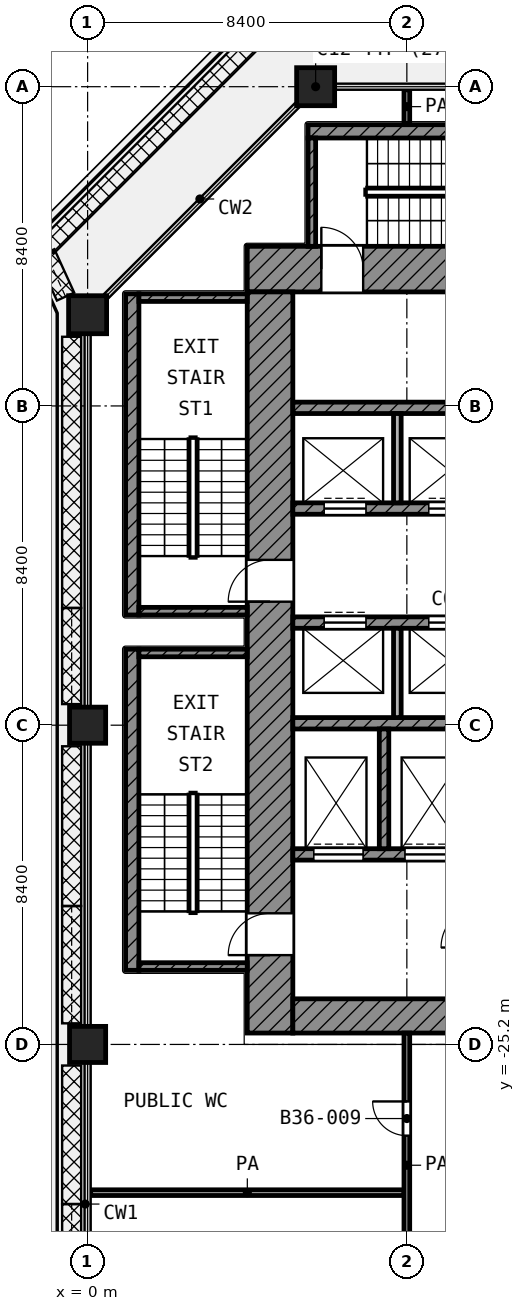
"""IFC4 building model, lengths in metres.
Left out: names, types, materials, properties, quantities, classifications, styles, units other than length and angle.
Written with IfcOpenShell. Run it as: python <this file> out.ifc"""

import sys

from ifc_helpers import new_model, si_unit, direction, frame, frame_2d, origin, origin_2d, place, context, subcontext, project, spatial, rectangle, extrude, element, fill, save


model = new_model("IFC4")
c1 = context("Model", 3, precision=1e-05, world=origin(), true_north=direction((0.0, 1.0)))
c2 = subcontext(c1, "Body", "Model", "MODEL_VIEW")
j1 = project(units=[si_unit("LENGTHUNIT", "METRE"), si_unit("PLANEANGLEUNIT", "RADIAN")], contexts=[c1])
p1 = place(None, origin())
s1 = spatial("IfcSite", under=j1, at=p1, CompositionType="ELEMENT")
p2 = place(p1, origin())
s2 = spatial("IfcBuilding", under=s1, at=p2, CompositionType="ELEMENT")
p3 = place(p2, frame((0.0, 0.0, 158.4)))
s3 = spatial("IfcBuildingStorey", under=s2, at=p3, CompositionType="ELEMENT", Elevation=158.4)
for number, where, z_axis, x_axis in (
    (1, (6.0, 0.0, 0.0), (0.0, 0.0, 1.0), (1.0, 0.0, 0.0)),
    (2, (0.0, -6.0, 0.0), (0.0, 0.0, 1.0), (1.0, 0.0, 0.0)),
):
    element("IfcColumn", number, at=place(p3, frame(where, z_axis=z_axis, x_axis=x_axis)), inside=s3, PredefinedType="COLUMN", context=c2, shape_type="SweptSolid", body=[
        extrude(rectangle(XDim=1.0, YDim=1.0, at=origin_2d()), origin(), (0.0, 0.0, 1.0), 4.2),
    ])
for number, where, z_axis, x_axis in (
    (3, (0.0, -16.8, 0.0), (0.0, 0.0, 1.0), (1.0, 0.0, 0.0)),
    (4, (0.0, -25.2, 0.0), (0.0, 0.0, 1.0), (1.0, 0.0, 0.0)),
):
    element("IfcColumn", number, at=place(p3, frame(where, z_axis=z_axis, x_axis=x_axis)), inside=s3, PredefinedType="COLUMN", context=c2, shape_type="SweptSolid", body=[
        extrude(rectangle(XDim=0.95, YDim=0.95, at=origin_2d()), origin(), (0.0, 0.0, 1.0), 4.2),
    ])
p4 = place(p3, frame((4.2, -4.8, 0.0), z_axis=(0.0, 0.0, 1.0), x_axis=(1.0, 0.0, 0.0)))
e5 = element("IfcWall", 5, at=p4, inside=s3, PredefinedType="SHEAR", context=c2, shape_type="SweptSolid", body=[
    extrude(rectangle(XDim=20.7, YDim=1.2, at=frame_2d((10.35, 0.0))), origin(), (0.0, 0.0, 1.0), 3.6),
])
p5 = place(p4, frame((1.95, 0.0, 0.0)))
e6 = element("IfcOpeningElement", 6, at=p5, cuts=e5, PredefinedType="OPENING", context=c2, shape_type="SweptSolid", body=[
    extrude(rectangle(XDim=1.1, YDim=2.1, at=frame_2d((0.55, 1.05))), frame((0.0, 0.61, 0.0), z_axis=(0.0, -1.0, 0.0), x_axis=(1.0, 0.0, 0.0)), (0.0, 0.0, 1.0), 1.22),
])
p6 = place(p4, frame((17.95, 0.0, 0.0)))
e7 = element("IfcOpeningElement", 7, at=p6, cuts=e5, PredefinedType="OPENING", context=c2, shape_type="SweptSolid", body=[
    extrude(rectangle(XDim=1.1, YDim=2.1, at=frame_2d((0.55, 1.05))), frame((0.0, 0.61, 0.0), z_axis=(0.0, -1.0, 0.0), x_axis=(1.0, 0.0, 0.0)), (0.0, 0.0, 1.0), 1.22),
])
p7 = place(p3, frame((4.8, -24.9, 0.0), z_axis=(0.0, 0.0, 1.0), x_axis=(0.0, 1.0, 0.0)))
e8 = element("IfcWall", 8, at=p7, inside=s3, PredefinedType="SHEAR", context=c2, shape_type="SweptSolid", body=[
    extrude(rectangle(XDim=19.5, YDim=1.2, at=frame_2d((9.75, 0.0))), origin(), (0.0, 0.0, 1.0), 3.6),
])
p8 = place(p7, frame((11.35, 0.0, 0.0)))
e9 = element("IfcOpeningElement", 9, at=p8, cuts=e8, PredefinedType="OPENING", context=c2, shape_type="SweptSolid", body=[
    extrude(rectangle(XDim=1.1, YDim=2.1, at=frame_2d((0.55, 1.05))), frame((0.0, 0.61, 0.0), z_axis=(0.0, -1.0, 0.0), x_axis=(1.0, 0.0, 0.0)), (0.0, 0.0, 1.0), 1.22),
])
p9 = place(p7, frame((2.05, 0.0, 0.0)))
e10 = element("IfcOpeningElement", 10, at=p9, cuts=e8, PredefinedType="OPENING", context=c2, shape_type="SweptSolid", body=[
    extrude(rectangle(XDim=1.1, YDim=2.1, at=frame_2d((0.55, 1.05))), frame((0.0, 0.61, 0.0), z_axis=(0.0, -1.0, 0.0), x_axis=(1.0, 0.0, 0.0)), (0.0, 0.0, 1.0), 1.22),
])
p10 = place(p3, frame((5.4, -24.45, 0.0), z_axis=(0.0, 0.0, 1.0), x_axis=(1.0, 0.0, 0.0)))
e11 = element("IfcWall", 11, at=p10, inside=s3, PredefinedType="SHEAR", context=c2, shape_type="SweptSolid", body=[
    extrude(rectangle(XDim=18.6, YDim=0.9, at=frame_2d((9.3, 0.0))), origin(), (0.0, 0.0, 1.0), 3.6),
])
p11 = place(p10, frame((6.3, 0.0, 0.0)))
e12 = element("IfcOpeningElement", 12, at=p11, cuts=e11, PredefinedType="OPENING", context=c2, shape_type="SweptSolid", body=[
    extrude(rectangle(XDim=1.8, YDim=2.1, at=frame_2d((0.9, 1.05))), frame((0.0, 0.46, 0.0), z_axis=(0.0, -1.0, 0.0), x_axis=(1.0, 0.0, 0.0)), (0.0, 0.0, 1.0), 0.92),
])
p12 = place(p3, frame((5.4, -8.45, 0.0), z_axis=(0.0, 0.0, 1.0), x_axis=(1.0, 0.0, 0.0)))
e13 = element("IfcWall", 13, at=p12, inside=s3, PredefinedType="SHEAR", context=c2, shape_type="SweptSolid", body=[
    extrude(rectangle(XDim=16.65, YDim=0.3, at=frame_2d((8.325, 0.0))), origin(), (0.0, 0.0, 1.0), 3.6),
])
p13 = place(p3, frame((5.4, -11.1, 0.0), z_axis=(0.0, 0.0, 1.0), x_axis=(1.0, 0.0, 0.0)))
e14 = element("IfcWall", 14, at=p13, inside=s3, PredefinedType="SHEAR", context=c2, shape_type="SweptSolid", body=[
    extrude(rectangle(XDim=16.65, YDim=0.3, at=frame_2d((8.325, 0.0))), origin(), (0.0, 0.0, 1.0), 3.6),
])
p14 = place(p13, frame((0.825, 0.0, 0.0)))
e15 = element("IfcOpeningElement", 15, at=p14, cuts=e14, PredefinedType="OPENING", context=c2, shape_type="SweptSolid", body=[
    extrude(rectangle(XDim=1.1, YDim=2.1, at=frame_2d((0.55, 1.05))), frame((0.0, 0.16, 0.0), z_axis=(0.0, -1.0, 0.0), x_axis=(1.0, 0.0, 0.0)), (0.0, 0.0, 1.0), 0.32),
])
p15 = place(p13, frame((3.575, 0.0, 0.0)))
e16 = element("IfcOpeningElement", 16, at=p15, cuts=e14, PredefinedType="OPENING", context=c2, shape_type="SweptSolid", body=[
    extrude(rectangle(XDim=1.1, YDim=2.1, at=frame_2d((0.55, 1.05))), frame((0.0, 0.16, 0.0), z_axis=(0.0, -1.0, 0.0), x_axis=(1.0, 0.0, 0.0)), (0.0, 0.0, 1.0), 0.32),
])
p16 = place(p13, frame((6.325, 0.0, 0.0)))
e17 = element("IfcOpeningElement", 17, at=p16, cuts=e14, PredefinedType="OPENING", context=c2, shape_type="SweptSolid", body=[
    extrude(rectangle(XDim=1.1, YDim=2.1, at=frame_2d((0.55, 1.05))), frame((0.0, 0.16, 0.0), z_axis=(0.0, -1.0, 0.0), x_axis=(1.0, 0.0, 0.0)), (0.0, 0.0, 1.0), 0.32),
])
p17 = place(p13, frame((9.075, 0.0, 0.0)))
e18 = element("IfcOpeningElement", 18, at=p17, cuts=e14, PredefinedType="OPENING", context=c2, shape_type="SweptSolid", body=[
    extrude(rectangle(XDim=1.1, YDim=2.1, at=frame_2d((0.55, 1.05))), frame((0.0, 0.16, 0.0), z_axis=(0.0, -1.0, 0.0), x_axis=(1.0, 0.0, 0.0)), (0.0, 0.0, 1.0), 0.32),
])
p18 = place(p13, frame((11.825, 0.0, 0.0)))
e19 = element("IfcOpeningElement", 19, at=p18, cuts=e14, PredefinedType="OPENING", context=c2, shape_type="SweptSolid", body=[
    extrude(rectangle(XDim=1.1, YDim=2.1, at=frame_2d((0.55, 1.05))), frame((0.0, 0.16, 0.0), z_axis=(0.0, -1.0, 0.0), x_axis=(1.0, 0.0, 0.0)), (0.0, 0.0, 1.0), 0.32),
])
p19 = place(p13, frame((14.575, 0.0, 0.0)))
e20 = element("IfcOpeningElement", 20, at=p19, cuts=e14, PredefinedType="OPENING", context=c2, shape_type="SweptSolid", body=[
    extrude(rectangle(XDim=1.1, YDim=2.1, at=frame_2d((0.55, 1.05))), frame((0.0, 0.16, 0.0), z_axis=(0.0, -1.0, 0.0), x_axis=(1.0, 0.0, 0.0)), (0.0, 0.0, 1.0), 0.32),
])
p20 = place(p3, frame((5.4, -14.1, 0.0), z_axis=(0.0, 0.0, 1.0), x_axis=(1.0, 0.0, 0.0)))
e21 = element("IfcWall", 21, at=p20, inside=s3, PredefinedType="SHEAR", context=c2, shape_type="SweptSolid", body=[
    extrude(rectangle(XDim=16.65, YDim=0.3, at=frame_2d((8.325, 0.0))), origin(), (0.0, 0.0, 1.0), 3.6),
])
p21 = place(p20, frame((0.825, 0.0, 0.0)))
e22 = element("IfcOpeningElement", 22, at=p21, cuts=e21, PredefinedType="OPENING", context=c2, shape_type="SweptSolid", body=[
    extrude(rectangle(XDim=1.1, YDim=2.1, at=frame_2d((0.55, 1.05))), frame((0.0, 0.16, 0.0), z_axis=(0.0, -1.0, 0.0), x_axis=(1.0, 0.0, 0.0)), (0.0, 0.0, 1.0), 0.32),
])
p22 = place(p20, frame((3.575, 0.0, 0.0)))
e23 = element("IfcOpeningElement", 23, at=p22, cuts=e21, PredefinedType="OPENING", context=c2, shape_type="SweptSolid", body=[
    extrude(rectangle(XDim=1.1, YDim=2.1, at=frame_2d((0.55, 1.05))), frame((0.0, 0.16, 0.0), z_axis=(0.0, -1.0, 0.0), x_axis=(1.0, 0.0, 0.0)), (0.0, 0.0, 1.0), 0.32),
])
p23 = place(p3, frame((5.4, -16.75, 0.0), z_axis=(0.0, 0.0, 1.0), x_axis=(1.0, 0.0, 0.0)))
e24 = element("IfcWall", 24, at=p23, inside=s3, PredefinedType="SHEAR", context=c2, shape_type="SweptSolid", body=[
    extrude(rectangle(XDim=16.65, YDim=0.3, at=frame_2d((8.325, 0.0))), origin(), (0.0, 0.0, 1.0), 3.6),
])
p24 = place(p3, frame((5.4, -20.2, 0.0), z_axis=(0.0, 0.0, 1.0), x_axis=(1.0, 0.0, 0.0)))
e25 = element("IfcWall", 25, at=p24, inside=s3, PredefinedType="SHEAR", context=c2, shape_type="SweptSolid", body=[
    extrude(rectangle(XDim=14.65, YDim=0.3, at=frame_2d((7.325, 0.0))), origin(), (0.0, 0.0, 1.0), 3.6),
])
p25 = place(p24, frame((10.55, 0.0, 0.0)))
e26 = element("IfcOpeningElement", 26, at=p25, cuts=e25, PredefinedType="OPENING", context=c2, shape_type="SweptSolid", body=[
    extrude(rectangle(XDim=1.3, YDim=2.1, at=frame_2d((0.65, 1.05))), frame((0.0, 0.16, 0.0), z_axis=(0.0, -1.0, 0.0), x_axis=(1.0, 0.0, 0.0)), (0.0, 0.0, 1.0), 0.32),
])
p26 = place(p24, frame((12.95, 0.0, 0.0)))
e27 = element("IfcOpeningElement", 27, at=p26, cuts=e25, PredefinedType="OPENING", context=c2, shape_type="SweptSolid", body=[
    extrude(rectangle(XDim=1.3, YDim=2.1, at=frame_2d((0.65, 1.05))), frame((0.0, 0.16, 0.0), z_axis=(0.0, -1.0, 0.0), x_axis=(1.0, 0.0, 0.0)), (0.0, 0.0, 1.0), 0.32),
])
p27 = place(p24, frame((0.55, 0.0, 0.0)))
e28 = element("IfcOpeningElement", 28, at=p27, cuts=e25, PredefinedType="OPENING", context=c2, shape_type="SweptSolid", body=[
    extrude(rectangle(XDim=1.3, YDim=2.1, at=frame_2d((0.65, 1.05))), frame((0.0, 0.16, 0.0), z_axis=(0.0, -1.0, 0.0), x_axis=(1.0, 0.0, 0.0)), (0.0, 0.0, 1.0), 0.32),
])
p28 = place(p24, frame((2.95, 0.0, 0.0)))
e29 = element("IfcOpeningElement", 29, at=p28, cuts=e25, PredefinedType="OPENING", context=c2, shape_type="SweptSolid", body=[
    extrude(rectangle(XDim=1.3, YDim=2.1, at=frame_2d((0.65, 1.05))), frame((0.0, 0.16, 0.0), z_axis=(0.0, -1.0, 0.0), x_axis=(1.0, 0.0, 0.0)), (0.0, 0.0, 1.0), 0.32),
])
p29 = place(p24, frame((6.55, 0.0, 0.0)))
e30 = element("IfcOpeningElement", 30, at=p29, cuts=e25, PredefinedType="OPENING", context=c2, shape_type="SweptSolid", body=[
    extrude(rectangle(XDim=0.9, YDim=2.1, at=frame_2d((0.45, 1.05))), frame((0.0, 0.16, 0.0), z_axis=(0.0, -1.0, 0.0), x_axis=(1.0, 0.0, 0.0)), (0.0, 0.0, 1.0), 0.32),
])
p30 = place(p24, frame((8.95, 0.0, 0.0)))
e31 = element("IfcOpeningElement", 31, at=p30, cuts=e25, PredefinedType="OPENING", context=c2, shape_type="SweptSolid", body=[
    extrude(rectangle(XDim=0.9, YDim=2.1, at=frame_2d((0.45, 1.05))), frame((0.0, 0.16, 0.0), z_axis=(0.0, -1.0, 0.0), x_axis=(1.0, 0.0, 0.0)), (0.0, 0.0, 1.0), 0.32),
])
p31 = place(p3, frame((7.8, -20.05, 0.0), z_axis=(0.0, 0.0, 1.0), x_axis=(0.0, 1.0, 0.0)))
e32 = element("IfcWall", 32, at=p31, inside=s3, PredefinedType="SHEAR", context=c2, shape_type="SweptSolid", body=[
    extrude(rectangle(XDim=3.15, YDim=0.25, at=frame_2d((1.575, 0.0))), origin(), (0.0, 0.0, 1.0), 3.6),
])
p32 = place(p3, frame((8.15, -10.95, 0.0), z_axis=(0.0, 0.0, 1.0), x_axis=(0.0, 1.0, 0.0)))
e33 = element("IfcWall", 33, at=p32, inside=s3, PredefinedType="PARTITIONING", context=c2, shape_type="SweptSolid", body=[
    extrude(rectangle(XDim=2.35, YDim=0.2, at=frame_2d((1.175, 0.0))), origin(), (0.0, 0.0, 1.0), 3.6),
])
p33 = place(p3, frame((8.15, -16.6, 0.0), z_axis=(0.0, 0.0, 1.0), x_axis=(0.0, 1.0, 0.0)))
e34 = element("IfcWall", 34, at=p33, inside=s3, PredefinedType="PARTITIONING", context=c2, shape_type="SweptSolid", body=[
    extrude(rectangle(XDim=2.35, YDim=0.2, at=frame_2d((1.175, 0.0))), origin(), (0.0, 0.0, 1.0), 3.6),
])
p34 = place(p3, frame((1.175, -13.9, 0.0), z_axis=(0.0, 0.0, 1.0), x_axis=(0.0, 1.0, 0.0)))
e35 = element("IfcWall", 35, at=p34, inside=s3, PredefinedType="SHEAR", context=c2, shape_type="SweptSolid", body=[
    extrude(rectangle(XDim=8.45, YDim=0.35, at=frame_2d((4.225, 0.0))), origin(), (0.0, 0.0, 1.0), 3.6),
])
for number, where, z_axis, x_axis in (
    (36, (1.35, -5.55, 0.0), (0.0, 0.0, 1.0), (1.0, 0.0, 0.0)),
    (37, (1.35, -13.8, 0.0), (0.0, 0.0, 1.0), (1.0, 0.0, 0.0)),
):
    element("IfcWall", number, at=place(p3, frame(where, z_axis=z_axis, x_axis=x_axis)), inside=s3, PredefinedType="SHEAR", context=c2, shape_type="SweptSolid", body=[
        extrude(rectangle(XDim=2.85, YDim=0.2, at=frame_2d((1.425, 0.0))), origin(), (0.0, 0.0, 1.0), 3.6),
    ])
p35 = place(p3, frame((1.175, -23.25, 0.0), z_axis=(0.0, 0.0, 1.0), x_axis=(0.0, 1.0, 0.0)))
e38 = element("IfcWall", 38, at=p35, inside=s3, PredefinedType="SHEAR", context=c2, shape_type="SweptSolid", body=[
    extrude(rectangle(XDim=8.45, YDim=0.35, at=frame_2d((4.225, 0.0))), origin(), (0.0, 0.0, 1.0), 3.6),
])
for number, where, z_axis, x_axis in (
    (39, (1.35, -14.9, 0.0), (0.0, 0.0, 1.0), (1.0, 0.0, 0.0)),
    (40, (1.35, -23.15, 0.0), (0.0, 0.0, 1.0), (1.0, 0.0, 0.0)),
):
    element("IfcWall", number, at=place(p3, frame(where, z_axis=z_axis, x_axis=x_axis)), inside=s3, PredefinedType="SHEAR", context=c2, shape_type="SweptSolid", body=[
        extrude(rectangle(XDim=2.85, YDim=0.2, at=frame_2d((1.425, 0.0))), origin(), (0.0, 0.0, 1.0), 3.6),
    ])
p36 = place(p3, frame((5.8, -1.175, 0.0), z_axis=(0.0, 0.0, 1.0), x_axis=(1.0, 0.0, 0.0)))
e41 = element("IfcWall", 41, at=p36, inside=s3, PredefinedType="SHEAR", context=c2, shape_type="SweptSolid", body=[
    extrude(rectangle(XDim=8.45, YDim=0.35, at=frame_2d((4.225, 0.0))), origin(), (0.0, 0.0, 1.0), 3.6),
])
p37 = place(p3, frame((5.9, -4.2, 0.0), z_axis=(0.0, 0.0, 1.0), x_axis=(0.0, 1.0, 0.0)))
e42 = element("IfcWall", 42, at=p37, inside=s3, PredefinedType="SHEAR", context=c2, shape_type="SweptSolid", body=[
    extrude(rectangle(XDim=2.85, YDim=0.2, at=frame_2d((1.425, 0.0))), origin(), (0.0, 0.0, 1.0), 3.6),
])
p38 = place(p3, frame((0.08, -29.1, 0.0), z_axis=(0.0, 0.0, 1.0), x_axis=(1.0, 0.0, 0.0)))
e43 = element("IfcWall", 43, at=p38, inside=s3, PredefinedType="PARTITIONING", context=c2, shape_type="SweptSolid", body=[
    extrude(rectangle(XDim=8.245, YDim=0.15, at=frame_2d((4.123, 0.0))), origin(), (0.0, 0.0, 1.0), 3.6),
])
p39 = place(p3, frame((8.4, -31.857, 0.0), z_axis=(0.0, 0.0, 1.0), x_axis=(0.0, 1.0, 0.0)))
e44 = element("IfcWall", 44, at=p39, inside=s3, PredefinedType="PARTITIONING", context=c2, shape_type="SweptSolid", body=[
    extrude(rectangle(XDim=6.957, YDim=0.15, at=frame_2d((3.479, 0.0))), origin(), (0.0, 0.0, 1.0), 3.6),
])
p40 = place(p39, frame((4.257, 0.0, 0.0)))
e45 = element("IfcOpeningElement", 45, at=p40, cuts=e44, PredefinedType="OPENING", context=c2, shape_type="SweptSolid", body=[
    extrude(rectangle(XDim=0.9, YDim=2.1, at=frame_2d((0.45, 1.05))), frame((0.0, 0.085, 0.0), z_axis=(0.0, -1.0, 0.0), x_axis=(1.0, 0.0, 0.0)), (0.0, 0.0, 1.0), 0.17),
])
p41 = place(p3, frame((8.4, -0.97, 0.0), z_axis=(0.0, 0.0, 1.0), x_axis=(0.0, 1.0, 0.0)))
e46 = element("IfcWall", 46, at=p41, inside=s3, PredefinedType="PARTITIONING", context=c2, shape_type="SweptSolid", body=[
    extrude(rectangle(XDim=0.89, YDim=0.15, at=frame_2d((0.445, 0.0))), origin(), (0.0, 0.0, 1.0), 2.7),
])
p42 = place(p14, origin())
e47 = element("IfcDoor", 47, at=p42, inside=s3, OperationType="DOUBLE_DOOR_SLIDING", PredefinedType="DOOR", context=c2, shape_type="SweptSolid", body=[
    extrude(rectangle(XDim=1.1, YDim=2.1, at=frame_2d((0.55, 1.05))), frame((0.0, 0.025, 0.0), z_axis=(0.0, -1.0, 0.0), x_axis=(1.0, 0.0, 0.0)), (0.0, 0.0, 1.0), 0.05),
])
fill(e15, e47)
p43 = place(p15, origin())
e48 = element("IfcDoor", 48, at=p43, inside=s3, OperationType="DOUBLE_DOOR_SLIDING", PredefinedType="DOOR", context=c2, shape_type="SweptSolid", body=[
    extrude(rectangle(XDim=1.1, YDim=2.1, at=frame_2d((0.55, 1.05))), frame((0.0, 0.025, 0.0), z_axis=(0.0, -1.0, 0.0), x_axis=(1.0, 0.0, 0.0)), (0.0, 0.0, 1.0), 0.05),
])
fill(e16, e48)
p44 = place(p21, origin())
e49 = element("IfcDoor", 49, at=p44, inside=s3, OperationType="DOUBLE_DOOR_SLIDING", PredefinedType="DOOR", context=c2, shape_type="SweptSolid", body=[
    extrude(rectangle(XDim=1.1, YDim=2.1, at=frame_2d((0.55, 1.05))), frame((0.0, 0.025, 0.0), z_axis=(0.0, -1.0, 0.0), x_axis=(1.0, 0.0, 0.0)), (0.0, 0.0, 1.0), 0.05),
])
fill(e22, e49)
p45 = place(p22, origin())
e50 = element("IfcDoor", 50, at=p45, inside=s3, OperationType="DOUBLE_DOOR_SLIDING", PredefinedType="DOOR", context=c2, shape_type="SweptSolid", body=[
    extrude(rectangle(XDim=1.1, YDim=2.1, at=frame_2d((0.55, 1.05))), frame((0.0, 0.025, 0.0), z_axis=(0.0, -1.0, 0.0), x_axis=(1.0, 0.0, 0.0)), (0.0, 0.0, 1.0), 0.05),
])
fill(e23, e50)
p46 = place(p27, origin())
e51 = element("IfcDoor", 51, at=p46, inside=s3, OperationType="DOUBLE_DOOR_SLIDING", PredefinedType="DOOR", context=c2, shape_type="SweptSolid", body=[
    extrude(rectangle(XDim=1.3, YDim=2.1, at=frame_2d((0.65, 1.05))), frame((0.0, 0.025, 0.0), z_axis=(0.0, -1.0, 0.0), x_axis=(1.0, 0.0, 0.0)), (0.0, 0.0, 1.0), 0.05),
])
fill(e28, e51)
p47 = place(p28, origin())
e52 = element("IfcDoor", 52, at=p47, inside=s3, OperationType="DOUBLE_DOOR_SLIDING", PredefinedType="DOOR", context=c2, shape_type="SweptSolid", body=[
    extrude(rectangle(XDim=1.3, YDim=2.1, at=frame_2d((0.65, 1.05))), frame((0.0, 0.025, 0.0), z_axis=(0.0, -1.0, 0.0), x_axis=(1.0, 0.0, 0.0)), (0.0, 0.0, 1.0), 0.05),
])
fill(e29, e52)
p48 = place(p8, origin())
e53 = element("IfcDoor", 53, at=p48, inside=s3, OperationType="SINGLE_SWING_LEFT", PredefinedType="DOOR", context=c2, shape_type="SweptSolid", body=[
    extrude(rectangle(XDim=1.1, YDim=2.1, at=frame_2d((0.55, 1.05))), frame((0.0, 0.025, 0.0), z_axis=(0.0, -1.0, 0.0), x_axis=(1.0, 0.0, 0.0)), (0.0, 0.0, 1.0), 0.05),
])
fill(e9, e53)
p49 = place(p9, origin())
e54 = element("IfcDoor", 54, at=p49, inside=s3, OperationType="SINGLE_SWING_LEFT", PredefinedType="DOOR", context=c2, shape_type="SweptSolid", body=[
    extrude(rectangle(XDim=1.1, YDim=2.1, at=frame_2d((0.55, 1.05))), frame((0.0, 0.025, 0.0), z_axis=(0.0, -1.0, 0.0), x_axis=(1.0, 0.0, 0.0)), (0.0, 0.0, 1.0), 0.05),
])
fill(e10, e54)
p50 = place(p5, origin())
e55 = element("IfcDoor", 55, at=p50, inside=s3, OperationType="SINGLE_SWING_LEFT", PredefinedType="DOOR", context=c2, shape_type="SweptSolid", body=[
    extrude(rectangle(XDim=1.1, YDim=2.1, at=frame_2d((0.55, 1.05))), frame((0.0, 0.025, 0.0), z_axis=(0.0, -1.0, 0.0), x_axis=(1.0, 0.0, 0.0)), (0.0, 0.0, 1.0), 0.05),
])
fill(e6, e55)
p51 = place(p40, origin())
e56 = element("IfcDoor", 56, at=p51, inside=s3, OperationType="SINGLE_SWING_RIGHT", PredefinedType="DOOR", context=c2, shape_type="SweptSolid", body=[
    extrude(rectangle(XDim=0.9, YDim=2.1, at=frame_2d((0.45, 1.05))), frame((0.0, 0.025, 0.0), z_axis=(0.0, -1.0, 0.0), x_axis=(1.0, 0.0, 0.0)), (0.0, 0.0, 1.0), 0.05),
])
fill(e45, e56)
save(model, sys.argv[1])
